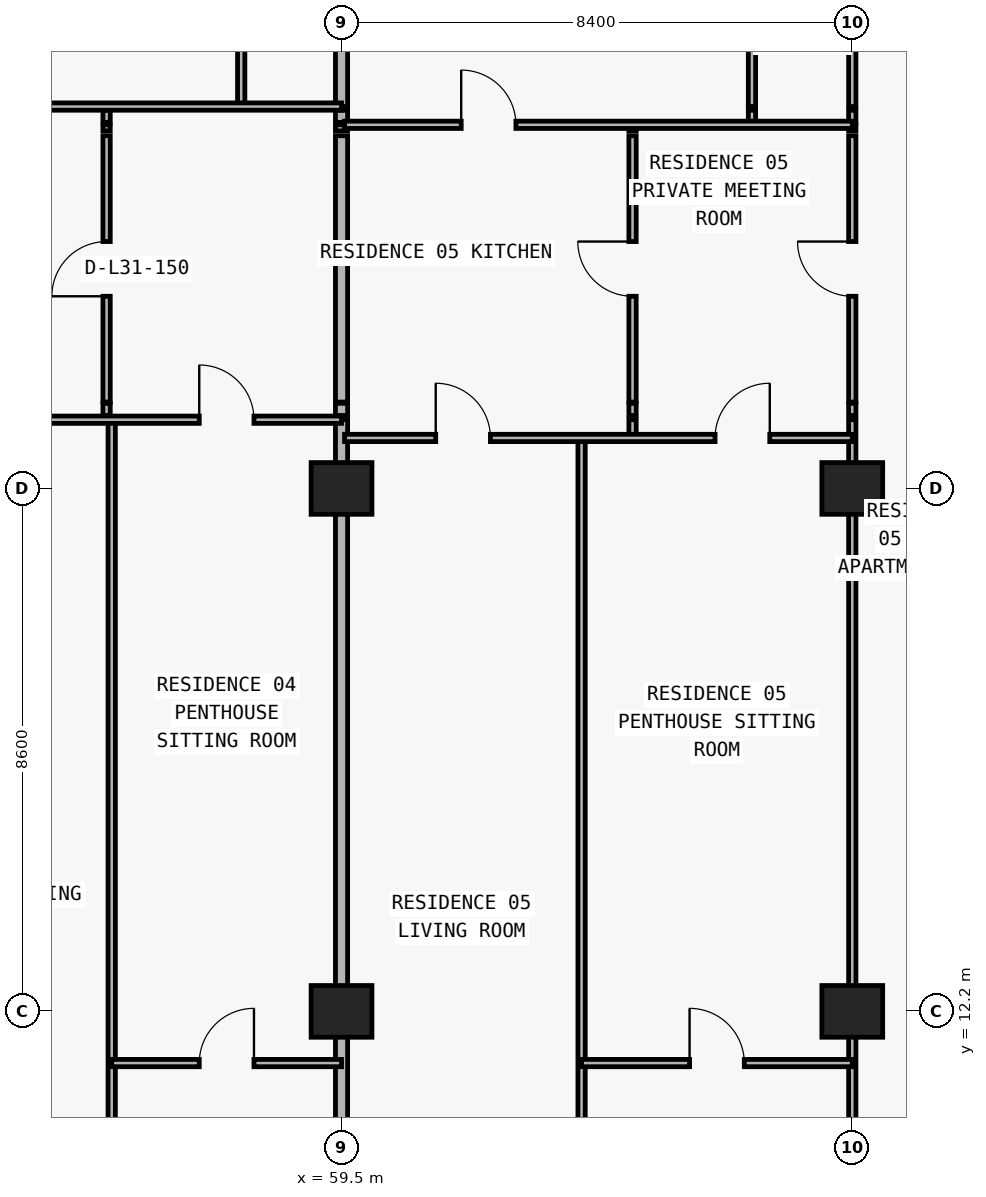
"""IFC4 building model, lengths in metres.
Left out: names, types, materials, properties, quantities, classifications, styles, units other than length and angle.
Written with IfcOpenShell. Run it as: python <this file> out.ifc"""

import sys

from ifc_helpers import new_model, si_unit, direction, frame, frame_2d, origin, origin_2d, place, context, subcontext, project, spatial, rectangle, extrude, element, fill, save


model = new_model("IFC4")
c1 = context("Model", 3, precision=1e-05, world=origin(), true_north=direction((0.0, 1.0)))
c2 = subcontext(c1, "Body", "Model", "MODEL_VIEW")
j1 = project(units=[si_unit("LENGTHUNIT", "METRE"), si_unit("PLANEANGLEUNIT", "RADIAN")], contexts=[c1])
p1 = place(None, origin())
s1 = spatial("IfcSite", under=j1, at=p1, CompositionType="ELEMENT")
p2 = place(p1, origin())
s2 = spatial("IfcBuilding", under=s1, at=p2, CompositionType="ELEMENT")
p3 = place(p2, frame((0.0, 0.0, 115.8)))
s3 = spatial("IfcBuildingStorey", under=s2, at=p3, CompositionType="ELEMENT", Elevation=115.8)
for number, where, z_axis, x_axis in (
    (1, (59.5, 12.2, 0.0), (0.0, 0.0, 1.0), (1.0, 0.0, 0.0)),
    (2, (67.9, 12.2, 0.0), (0.0, 0.0, 1.0), (1.0, 0.0, 0.0)),
    (3, (59.5, 20.8, 0.0), (0.0, 0.0, 1.0), (1.0, 0.0, 0.0)),
    (4, (67.9, 20.8, 0.0), (0.0, 0.0, 1.0), (1.0, 0.0, 0.0)),
):
    element("IfcColumn", number, at=place(p3, frame(where, z_axis=z_axis, x_axis=x_axis)), inside=s3, PredefinedType="COLUMN", context=c2, shape_type="SweptSolid", body=[
        extrude(rectangle(XDim=1.0, YDim=0.85, at=origin_2d()), origin(), (0.0, 0.0, 1.0), 3.05),
    ])
p4 = place(p3, frame((55.636, 22.0, 0.0), z_axis=(0.0, 0.0, 1.0), x_axis=(0.0, 1.0, 0.0)))
e5 = element("IfcWall", 5, at=p4, inside=s3, PredefinedType="PARTITIONING", context=c2, shape_type="SweptSolid", body=[
    extrude(rectangle(XDim=0.2, YDim=0.12, at=frame_2d((0.1, 0.0))), origin(), (0.0, 0.0, 1.0), 3.05),
])
p5 = place(p3, frame((55.636, 22.22, 0.0), z_axis=(0.0, 0.0, 1.0), x_axis=(0.0, 1.0, 0.0)))
e6 = element("IfcWall", 6, at=p5, inside=s3, PredefinedType="PARTITIONING", context=c2, shape_type="SweptSolid", body=[
    extrude(rectangle(XDim=4.38, YDim=0.12, at=frame_2d((2.19, 0.0))), origin(), (0.0, 0.0, 1.0), 3.05),
])
p6 = place(p5, frame((1.74, 0.0, 0.0)))
e7 = element("IfcOpeningElement", 7, at=p6, cuts=e6, PredefinedType="OPENING", context=c2, shape_type="SweptSolid", body=[
    extrude(rectangle(XDim=0.9, YDim=2.15, at=frame_2d((0.45, 1.075))), frame((0.0, 0.07, 0.0), z_axis=(0.0, -1.0, 0.0), x_axis=(1.0, 0.0, 0.0)), (0.0, 0.0, 1.0), 0.14),
])
p7 = place(p3, frame((55.636, 26.68, 0.0), z_axis=(0.0, 0.0, 1.0), x_axis=(0.0, 1.0, 0.0)))
e8 = element("IfcWall", 8, at=p7, inside=s3, PredefinedType="PARTITIONING", context=c2, shape_type="SweptSolid", body=[
    extrude(rectangle(XDim=0.1, YDim=0.12, at=frame_2d((0.05, 0.0))), origin(), (0.0, 0.0, 1.0), 3.05),
])
p8 = place(p3, frame((55.636, 26.82, 0.0), z_axis=(0.0, 0.0, 1.0), x_axis=(0.0, 1.0, 0.0)))
e9 = element("IfcWall", 9, at=p8, inside=s3, PredefinedType="PARTITIONING", context=c2, shape_type="SweptSolid", body=[
    extrude(rectangle(XDim=0.2, YDim=0.12, at=frame_2d((0.1, 0.0))), origin(), (0.0, 0.0, 1.0), 3.05),
])
p9 = place(p3, frame((55.72, 8.84, 0.0), z_axis=(0.0, 0.0, 1.0), x_axis=(0.0, 1.0, 0.0)))
e10 = element("IfcWall", 10, at=p9, inside=s3, PredefinedType="PARTITIONING", context=c2, shape_type="SweptSolid", body=[
    extrude(rectangle(XDim=13.09, YDim=0.12, at=frame_2d((6.545, 0.0))), origin(), (0.0, 0.0, 1.0), 3.05),
])
p10 = place(p3, frame((57.85, 27.08, 0.0), z_axis=(0.0, 0.0, 1.0), x_axis=(0.0, 1.0, 0.0)))
e11 = element("IfcWall", 11, at=p10, inside=s3, PredefinedType="PARTITIONING", context=c2, shape_type="SweptSolid", body=[
    extrude(rectangle(XDim=6.52, YDim=0.12, at=frame_2d((3.26, 0.0))), origin(), (0.0, 0.0, 1.0), 3.05),
])
p11 = place(p10, frame((3.285, 0.0, 0.0)))
e12 = element("IfcOpeningElement", 12, at=p11, cuts=e11, PredefinedType="OPENING", context=c2, shape_type="SweptSolid", body=[
    extrude(rectangle(XDim=0.85, YDim=2.1, at=frame_2d((0.425, 1.05))), frame((0.0, 0.07, 0.0), z_axis=(0.0, -1.0, 0.0), x_axis=(1.0, 0.0, 0.0)), (0.0, 0.0, 1.0), 0.14),
])
p12 = place(p3, frame((59.5, 8.84, 0.0), z_axis=(0.0, 0.0, 1.0), x_axis=(0.0, 1.0, 0.0)))
e13 = element("IfcWall", 13, at=p12, inside=s3, PredefinedType="PARTITIONING", context=c2, shape_type="SweptSolid", body=[
    extrude(rectangle(XDim=13.09, YDim=0.2, at=frame_2d((6.545, 0.0))), origin(), (0.0, 0.0, 1.0), 2.174),
])
p13 = place(p3, frame((59.5, 22.0, 0.0), z_axis=(0.0, 0.0, 1.0), x_axis=(0.0, 1.0, 0.0)))
e14 = element("IfcWall", 14, at=p13, inside=s3, PredefinedType="PARTITIONING", context=c2, shape_type="SweptSolid", body=[
    extrude(rectangle(XDim=0.2, YDim=0.2, at=frame_2d((0.1, 0.0))), origin(), (0.0, 0.0, 1.0), 2.174),
])
p14 = place(p3, frame((59.5, 22.22, 0.0), z_axis=(0.0, 0.0, 1.0), x_axis=(0.0, 1.0, 0.0)))
e15 = element("IfcWall", 15, at=p14, inside=s3, PredefinedType="PARTITIONING", context=c2, shape_type="SweptSolid", body=[
    extrude(rectangle(XDim=4.38, YDim=0.2, at=frame_2d((2.19, 0.0))), origin(), (0.0, 0.0, 1.0), 2.174),
])
p15 = place(p3, frame((59.5, 26.68, 0.0), z_axis=(0.0, 0.0, 1.0), x_axis=(0.0, 1.0, 0.0)))
e16 = element("IfcWall", 16, at=p15, inside=s3, PredefinedType="PARTITIONING", context=c2, shape_type="SweptSolid", body=[
    extrude(rectangle(XDim=0.1, YDim=0.2, at=frame_2d((0.05, 0.0))), origin(), (0.0, 0.0, 1.0), 2.174),
])
p16 = place(p3, frame((59.5, 26.82, 0.0), z_axis=(0.0, 0.0, 1.0), x_axis=(0.0, 1.0, 0.0)))
e17 = element("IfcWall", 17, at=p16, inside=s3, PredefinedType="PARTITIONING", context=c2, shape_type="SweptSolid", body=[
    extrude(rectangle(XDim=0.2, YDim=0.2, at=frame_2d((0.1, 0.0))), origin(), (0.0, 0.0, 1.0), 2.174),
])
p17 = place(p3, frame((59.5, 27.08, 0.0), z_axis=(0.0, 0.0, 1.0), x_axis=(0.0, 1.0, 0.0)))
e18 = element("IfcWall", 18, at=p17, inside=s3, PredefinedType="PARTITIONING", context=c2, shape_type="SweptSolid", body=[
    extrude(rectangle(XDim=6.52, YDim=0.2, at=frame_2d((3.26, 0.0))), origin(), (0.0, 0.0, 1.0), 2.174),
])
p18 = place(p3, frame((63.448, 8.84, 0.0), z_axis=(0.0, 0.0, 1.0), x_axis=(0.0, 1.0, 0.0)))
e19 = element("IfcWall", 19, at=p18, inside=s3, PredefinedType="PARTITIONING", context=c2, shape_type="SweptSolid", body=[
    extrude(rectangle(XDim=12.79, YDim=0.12, at=frame_2d((6.395, 0.0))), origin(), (0.0, 0.0, 1.0), 3.05),
])
p19 = place(p3, frame((64.286, 21.63, 0.0), z_axis=(0.0, 0.0, 1.0), x_axis=(0.0, 1.0, 0.0)))
e20 = element("IfcWall", 20, at=p19, inside=s3, PredefinedType="PARTITIONING", context=c2, shape_type="SweptSolid", body=[
    extrude(rectangle(XDim=0.3, YDim=0.12, at=frame_2d((0.15, 0.0))), origin(), (0.0, 0.0, 1.0), 3.05),
])
p20 = place(p3, frame((64.286, 22.0, 0.0), z_axis=(0.0, 0.0, 1.0), x_axis=(0.0, 1.0, 0.0)))
e21 = element("IfcWall", 21, at=p20, inside=s3, PredefinedType="PARTITIONING", context=c2, shape_type="SweptSolid", body=[
    extrude(rectangle(XDim=0.2, YDim=0.12, at=frame_2d((0.1, 0.0))), origin(), (0.0, 0.0, 1.0), 3.05),
])
p21 = place(p3, frame((64.286, 22.22, 0.0), z_axis=(0.0, 0.0, 1.0), x_axis=(0.0, 1.0, 0.0)))
e22 = element("IfcWall", 22, at=p21, inside=s3, PredefinedType="PARTITIONING", context=c2, shape_type="SweptSolid", body=[
    extrude(rectangle(XDim=4.38, YDim=0.12, at=frame_2d((2.19, 0.0))), origin(), (0.0, 0.0, 1.0), 3.05),
])
p22 = place(p21, frame((1.74, 0.0, 0.0)))
e23 = element("IfcOpeningElement", 23, at=p22, cuts=e22, PredefinedType="OPENING", context=c2, shape_type="SweptSolid", body=[
    extrude(rectangle(XDim=0.9, YDim=2.15, at=frame_2d((0.45, 1.075))), frame((0.0, 0.07, 0.0), z_axis=(0.0, -1.0, 0.0), x_axis=(1.0, 0.0, 0.0)), (0.0, 0.0, 1.0), 0.14),
])
p23 = place(p3, frame((64.286, 26.68, 0.0), z_axis=(0.0, 0.0, 1.0), x_axis=(0.0, 1.0, 0.0)))
e24 = element("IfcWall", 24, at=p23, inside=s3, PredefinedType="PARTITIONING", context=c2, shape_type="SweptSolid", body=[
    extrude(rectangle(XDim=0.1, YDim=0.12, at=frame_2d((0.05, 0.0))), origin(), (0.0, 0.0, 1.0), 3.05),
])
p24 = place(p3, frame((66.25, 26.82, 0.0), z_axis=(0.0, 0.0, 1.0), x_axis=(0.0, 1.0, 0.0)))
e25 = element("IfcWall", 25, at=p24, inside=s3, PredefinedType="PARTITIONING", context=c2, shape_type="SweptSolid", body=[
    extrude(rectangle(XDim=0.2, YDim=0.12, at=frame_2d((0.1, 0.0))), origin(), (0.0, 0.0, 1.0), 3.05),
])
p25 = place(p3, frame((66.25, 27.08, 0.0), z_axis=(0.0, 0.0, 1.0), x_axis=(0.0, 1.0, 0.0)))
e26 = element("IfcWall", 26, at=p25, inside=s3, PredefinedType="PARTITIONING", context=c2, shape_type="SweptSolid", body=[
    extrude(rectangle(XDim=6.52, YDim=0.12, at=frame_2d((3.26, 0.0))), origin(), (0.0, 0.0, 1.0), 3.05),
])
p26 = place(p25, frame((3.285, 0.0, 0.0)))
e27 = element("IfcOpeningElement", 27, at=p26, cuts=e26, PredefinedType="OPENING", context=c2, shape_type="SweptSolid", body=[
    extrude(rectangle(XDim=0.85, YDim=2.1, at=frame_2d((0.425, 1.05))), frame((0.0, 0.07, 0.0), z_axis=(0.0, -1.0, 0.0), x_axis=(1.0, 0.0, 0.0)), (0.0, 0.0, 1.0), 0.14),
])
p27 = place(p3, frame((67.9, 8.84, 0.0), z_axis=(0.0, 0.0, 1.0), x_axis=(0.0, 1.0, 0.0)))
e28 = element("IfcWall", 28, at=p27, inside=s3, PredefinedType="PARTITIONING", context=c2, shape_type="SweptSolid", body=[
    extrude(rectangle(XDim=13.09, YDim=0.12, at=frame_2d((6.545, 0.0))), origin(), (0.0, 0.0, 1.0), 2.174),
])
p28 = place(p3, frame((67.9, 22.0, 0.0), z_axis=(0.0, 0.0, 1.0), x_axis=(0.0, 1.0, 0.0)))
e29 = element("IfcWall", 29, at=p28, inside=s3, PredefinedType="PARTITIONING", context=c2, shape_type="SweptSolid", body=[
    extrude(rectangle(XDim=0.2, YDim=0.12, at=frame_2d((0.1, 0.0))), origin(), (0.0, 0.0, 1.0), 2.174),
])
p29 = place(p3, frame((67.9, 22.22, 0.0), z_axis=(0.0, 0.0, 1.0), x_axis=(0.0, 1.0, 0.0)))
e30 = element("IfcWall", 30, at=p29, inside=s3, PredefinedType="PARTITIONING", context=c2, shape_type="SweptSolid", body=[
    extrude(rectangle(XDim=4.38, YDim=0.12, at=frame_2d((2.19, 0.0))), origin(), (0.0, 0.0, 1.0), 2.174),
])
p30 = place(p29, frame((1.74, 0.0, 0.0)))
e31 = element("IfcOpeningElement", 31, at=p30, cuts=e30, PredefinedType="OPENING", context=c2, shape_type="SweptSolid", body=[
    extrude(rectangle(XDim=0.9, YDim=2.124, at=frame_2d((0.45, 1.062))), frame((0.0, 0.07, 0.0), z_axis=(0.0, -1.0, 0.0), x_axis=(1.0, 0.0, 0.0)), (0.0, 0.0, 1.0), 0.14),
])
p31 = place(p3, frame((67.9, 26.68, 0.0), z_axis=(0.0, 0.0, 1.0), x_axis=(0.0, 1.0, 0.0)))
e32 = element("IfcWall", 32, at=p31, inside=s3, PredefinedType="PARTITIONING", context=c2, shape_type="SweptSolid", body=[
    extrude(rectangle(XDim=0.1, YDim=0.12, at=frame_2d((0.05, 0.0))), origin(), (0.0, 0.0, 1.0), 2.174),
])
p32 = place(p3, frame((67.9, 26.82, 0.0), z_axis=(0.0, 0.0, 1.0), x_axis=(0.0, 1.0, 0.0)))
e33 = element("IfcWall", 33, at=p32, inside=s3, PredefinedType="PARTITIONING", context=c2, shape_type="SweptSolid", body=[
    extrude(rectangle(XDim=0.2, YDim=0.12, at=frame_2d((0.1, 0.0))), origin(), (0.0, 0.0, 1.0), 2.174),
])
p33 = place(p3, frame((67.9, 27.08, 0.0), z_axis=(0.0, 0.0, 1.0), x_axis=(0.0, 1.0, 0.0)))
e34 = element("IfcWall", 34, at=p33, inside=s3, PredefinedType="PARTITIONING", context=c2, shape_type="SweptSolid", body=[
    extrude(rectangle(XDim=6.52, YDim=0.12, at=frame_2d((3.26, 0.0))), origin(), (0.0, 0.0, 1.0), 2.174),
])
p34 = place(p3, frame((55.72, 11.35, 0.0), z_axis=(0.0, 0.0, 1.0), x_axis=(1.0, 0.0, 0.0)))
e35 = element("IfcWall", 35, at=p34, inside=s3, PredefinedType="PARTITIONING", context=c2, shape_type="SweptSolid", body=[
    extrude(rectangle(XDim=3.78, YDim=0.12, at=frame_2d((1.89, 0.0))), origin(), (0.0, 0.0, 1.0), 3.05),
])
p35 = place(p34, frame((1.44, 0.0, 0.0)))
e36 = element("IfcOpeningElement", 36, at=p35, cuts=e35, PredefinedType="OPENING", context=c2, shape_type="SweptSolid", body=[
    extrude(rectangle(XDim=0.9, YDim=2.15, at=frame_2d((0.45, 1.075))), frame((0.0, 0.07, 0.0), z_axis=(0.0, -1.0, 0.0), x_axis=(1.0, 0.0, 0.0)), (0.0, 0.0, 1.0), 0.14),
])
p36 = place(p3, frame((63.448, 11.35, 0.0), z_axis=(0.0, 0.0, 1.0), x_axis=(1.0, 0.0, 0.0)))
e37 = element("IfcWall", 37, at=p36, inside=s3, PredefinedType="PARTITIONING", context=c2, shape_type="SweptSolid", body=[
    extrude(rectangle(XDim=4.452, YDim=0.12, at=frame_2d((2.226, 0.0))), origin(), (0.0, 0.0, 1.0), 3.05),
])
p37 = place(p36, frame((1.776, 0.0, 0.0)))
e38 = element("IfcOpeningElement", 38, at=p37, cuts=e37, PredefinedType="OPENING", context=c2, shape_type="SweptSolid", body=[
    extrude(rectangle(XDim=0.9, YDim=2.15, at=frame_2d((0.45, 1.075))), frame((0.0, 0.07, 0.0), z_axis=(0.0, -1.0, 0.0), x_axis=(1.0, 0.0, 0.0)), (0.0, 0.0, 1.0), 0.14),
])
p38 = place(p3, frame((59.55, 21.63, 0.0), z_axis=(0.0, 0.0, 1.0), x_axis=(1.0, 0.0, 0.0)))
e39 = element("IfcWall", 39, at=p38, inside=s3, PredefinedType="PARTITIONING", context=c2, shape_type="SweptSolid", body=[
    extrude(rectangle(XDim=8.35, YDim=0.12, at=frame_2d((4.175, 0.0))), origin(), (0.0, 0.0, 1.0), 3.05),
])
p39 = place(p38, frame((1.499, 0.0, 0.0)))
e40 = element("IfcOpeningElement", 40, at=p39, cuts=e39, PredefinedType="OPENING", context=c2, shape_type="SweptSolid", body=[
    extrude(rectangle(XDim=0.9, YDim=2.15, at=frame_2d((0.45, 1.075))), frame((0.0, 0.07, 0.0), z_axis=(0.0, -1.0, 0.0), x_axis=(1.0, 0.0, 0.0)), (0.0, 0.0, 1.0), 0.14),
])
p40 = place(p38, frame((6.093, 0.0, 0.0)))
e41 = element("IfcOpeningElement", 41, at=p40, cuts=e39, PredefinedType="OPENING", context=c2, shape_type="SweptSolid", body=[
    extrude(rectangle(XDim=0.9, YDim=2.15, at=frame_2d((0.45, 1.075))), frame((0.0, 0.07, 0.0), z_axis=(0.0, -1.0, 0.0), x_axis=(1.0, 0.0, 0.0)), (0.0, 0.0, 1.0), 0.14),
])
p41 = place(p3, frame((51.32, 21.93, 0.0), z_axis=(0.0, 0.0, 1.0), x_axis=(1.0, 0.0, 0.0)))
e42 = element("IfcWall", 42, at=p41, inside=s3, PredefinedType="PARTITIONING", context=c2, shape_type="SweptSolid", body=[
    extrude(rectangle(XDim=8.18, YDim=0.12, at=frame_2d((4.09, 0.0))), origin(), (0.0, 0.0, 1.0), 3.05),
])
p42 = place(p41, frame((1.708, 0.0, 0.0)))
e43 = element("IfcOpeningElement", 43, at=p42, cuts=e42, PredefinedType="OPENING", context=c2, shape_type="SweptSolid", body=[
    extrude(rectangle(XDim=0.9, YDim=2.15, at=frame_2d((0.45, 1.075))), frame((0.0, 0.07, 0.0), z_axis=(0.0, -1.0, 0.0), x_axis=(1.0, 0.0, 0.0)), (0.0, 0.0, 1.0), 0.14),
])
p43 = place(p41, frame((5.84, 0.0, 0.0)))
e44 = element("IfcOpeningElement", 44, at=p43, cuts=e42, PredefinedType="OPENING", context=c2, shape_type="SweptSolid", body=[
    extrude(rectangle(XDim=0.9, YDim=2.15, at=frame_2d((0.45, 1.075))), frame((0.0, 0.07, 0.0), z_axis=(0.0, -1.0, 0.0), x_axis=(1.0, 0.0, 0.0)), (0.0, 0.0, 1.0), 0.14),
])
p44 = place(p3, frame((59.55, 26.78, 0.0), z_axis=(0.0, 0.0, 1.0), x_axis=(1.0, 0.0, 0.0)))
e45 = element("IfcWall", 45, at=p44, inside=s3, PredefinedType="PARTITIONING", context=c2, shape_type="SweptSolid", body=[
    extrude(rectangle(XDim=8.35, YDim=0.12, at=frame_2d((4.175, 0.0))), origin(), (0.0, 0.0, 1.0), 3.05),
])
p45 = place(p44, frame((1.918, 0.0, 0.0)))
e46 = element("IfcOpeningElement", 46, at=p45, cuts=e45, PredefinedType="OPENING", context=c2, shape_type="SweptSolid", body=[
    extrude(rectangle(XDim=0.9, YDim=2.15, at=frame_2d((0.45, 1.075))), frame((0.0, 0.07, 0.0), z_axis=(0.0, -1.0, 0.0), x_axis=(1.0, 0.0, 0.0)), (0.0, 0.0, 1.0), 0.14),
])
p46 = place(p3, frame((51.32, 27.08, 0.0), z_axis=(0.0, 0.0, 1.0), x_axis=(1.0, 0.0, 0.0)))
e47 = element("IfcWall", 47, at=p46, inside=s3, PredefinedType="PARTITIONING", context=c2, shape_type="SweptSolid", body=[
    extrude(rectangle(XDim=8.18, YDim=0.12, at=frame_2d((4.09, 0.0))), origin(), (0.0, 0.0, 1.0), 3.05),
])
p47 = place(p46, frame((1.708, 0.0, 0.0)))
e48 = element("IfcOpeningElement", 48, at=p47, cuts=e47, PredefinedType="OPENING", context=c2, shape_type="SweptSolid", body=[
    extrude(rectangle(XDim=0.9, YDim=2.15, at=frame_2d((0.45, 1.075))), frame((0.0, 0.07, 0.0), z_axis=(0.0, -1.0, 0.0), x_axis=(1.0, 0.0, 0.0)), (0.0, 0.0, 1.0), 0.14),
])
p48 = place(p6, origin())
e49 = element("IfcDoor", 49, at=p48, inside=s3, OperationType="SINGLE_SWING_LEFT", PredefinedType="DOOR", context=c2, shape_type="SweptSolid", body=[
    extrude(rectangle(XDim=0.9, YDim=2.15, at=frame_2d((0.45, 1.075))), frame((0.0, 0.025, 0.0), z_axis=(0.0, -1.0, 0.0), x_axis=(1.0, 0.0, 0.0)), (0.0, 0.0, 1.0), 0.05),
])
fill(e7, e49)
p49 = place(p43, origin())
e50 = element("IfcDoor", 50, at=p49, inside=s3, OperationType="SINGLE_SWING_LEFT", PredefinedType="DOOR", context=c2, shape_type="SweptSolid", body=[
    extrude(rectangle(XDim=0.9, YDim=2.15, at=frame_2d((0.45, 1.075))), frame((0.0, 0.025, 0.0), z_axis=(0.0, -1.0, 0.0), x_axis=(1.0, 0.0, 0.0)), (0.0, 0.0, 1.0), 0.05),
])
fill(e44, e50)
p50 = place(p35, origin())
e51 = element("IfcDoor", 51, at=p50, inside=s3, OperationType="SINGLE_SWING_RIGHT", PredefinedType="DOOR", context=c2, shape_type="SweptSolid", body=[
    extrude(rectangle(XDim=0.9, YDim=2.15, at=frame_2d((0.45, 1.075))), frame((0.0, 0.025, 0.0), z_axis=(0.0, -1.0, 0.0), x_axis=(1.0, 0.0, 0.0)), (0.0, 0.0, 1.0), 0.05),
])
fill(e36, e51)
p51 = place(p45, origin())
e52 = element("IfcDoor", 52, at=p51, inside=s3, OperationType="SINGLE_SWING_LEFT", PredefinedType="DOOR", context=c2, shape_type="SweptSolid", body=[
    extrude(rectangle(XDim=0.9, YDim=2.15, at=frame_2d((0.45, 1.075))), frame((0.0, 0.025, 0.0), z_axis=(0.0, -1.0, 0.0), x_axis=(1.0, 0.0, 0.0)), (0.0, 0.0, 1.0), 0.05),
])
fill(e46, e52)
p52 = place(p22, origin())
e53 = element("IfcDoor", 53, at=p52, inside=s3, OperationType="SINGLE_SWING_RIGHT", PredefinedType="DOOR", context=c2, shape_type="SweptSolid", body=[
    extrude(rectangle(XDim=0.9, YDim=2.15, at=frame_2d((0.45, 1.075))), frame((0.0, 0.025, 0.0), z_axis=(0.0, -1.0, 0.0), x_axis=(1.0, 0.0, 0.0)), (0.0, 0.0, 1.0), 0.05),
])
fill(e23, e53)
p53 = place(p39, origin())
e54 = element("IfcDoor", 54, at=p53, inside=s3, OperationType="SINGLE_SWING_LEFT", PredefinedType="DOOR", context=c2, shape_type="SweptSolid", body=[
    extrude(rectangle(XDim=0.9, YDim=2.15, at=frame_2d((0.45, 1.075))), frame((0.0, 0.025, 0.0), z_axis=(0.0, -1.0, 0.0), x_axis=(1.0, 0.0, 0.0)), (0.0, 0.0, 1.0), 0.05),
])
fill(e40, e54)
p54 = place(p40, origin())
e55 = element("IfcDoor", 55, at=p54, inside=s3, OperationType="SINGLE_SWING_RIGHT", PredefinedType="DOOR", context=c2, shape_type="SweptSolid", body=[
    extrude(rectangle(XDim=0.9, YDim=2.15, at=frame_2d((0.45, 1.075))), frame((0.0, 0.025, 0.0), z_axis=(0.0, -1.0, 0.0), x_axis=(1.0, 0.0, 0.0)), (0.0, 0.0, 1.0), 0.05),
])
fill(e41, e55)
p55 = place(p37, origin())
e56 = element("IfcDoor", 56, at=p55, inside=s3, OperationType="SINGLE_SWING_LEFT", PredefinedType="DOOR", context=c2, shape_type="SweptSolid", body=[
    extrude(rectangle(XDim=0.9, YDim=2.15, at=frame_2d((0.45, 1.075))), frame((0.0, 0.025, 0.0), z_axis=(0.0, -1.0, 0.0), x_axis=(1.0, 0.0, 0.0)), (0.0, 0.0, 1.0), 0.05),
])
fill(e38, e56)
p56 = place(p30, origin())
e57 = element("IfcDoor", 57, at=p56, inside=s3, OperationType="SINGLE_SWING_RIGHT", PredefinedType="DOOR", context=c2, shape_type="SweptSolid", body=[
    extrude(rectangle(XDim=0.9, YDim=2.124, at=frame_2d((0.45, 1.062))), frame((0.0, 0.025, 0.0), z_axis=(0.0, -1.0, 0.0), x_axis=(1.0, 0.0, 0.0)), (0.0, 0.0, 1.0), 0.05),
])
fill(e31, e57)
save(model, sys.argv[1])
